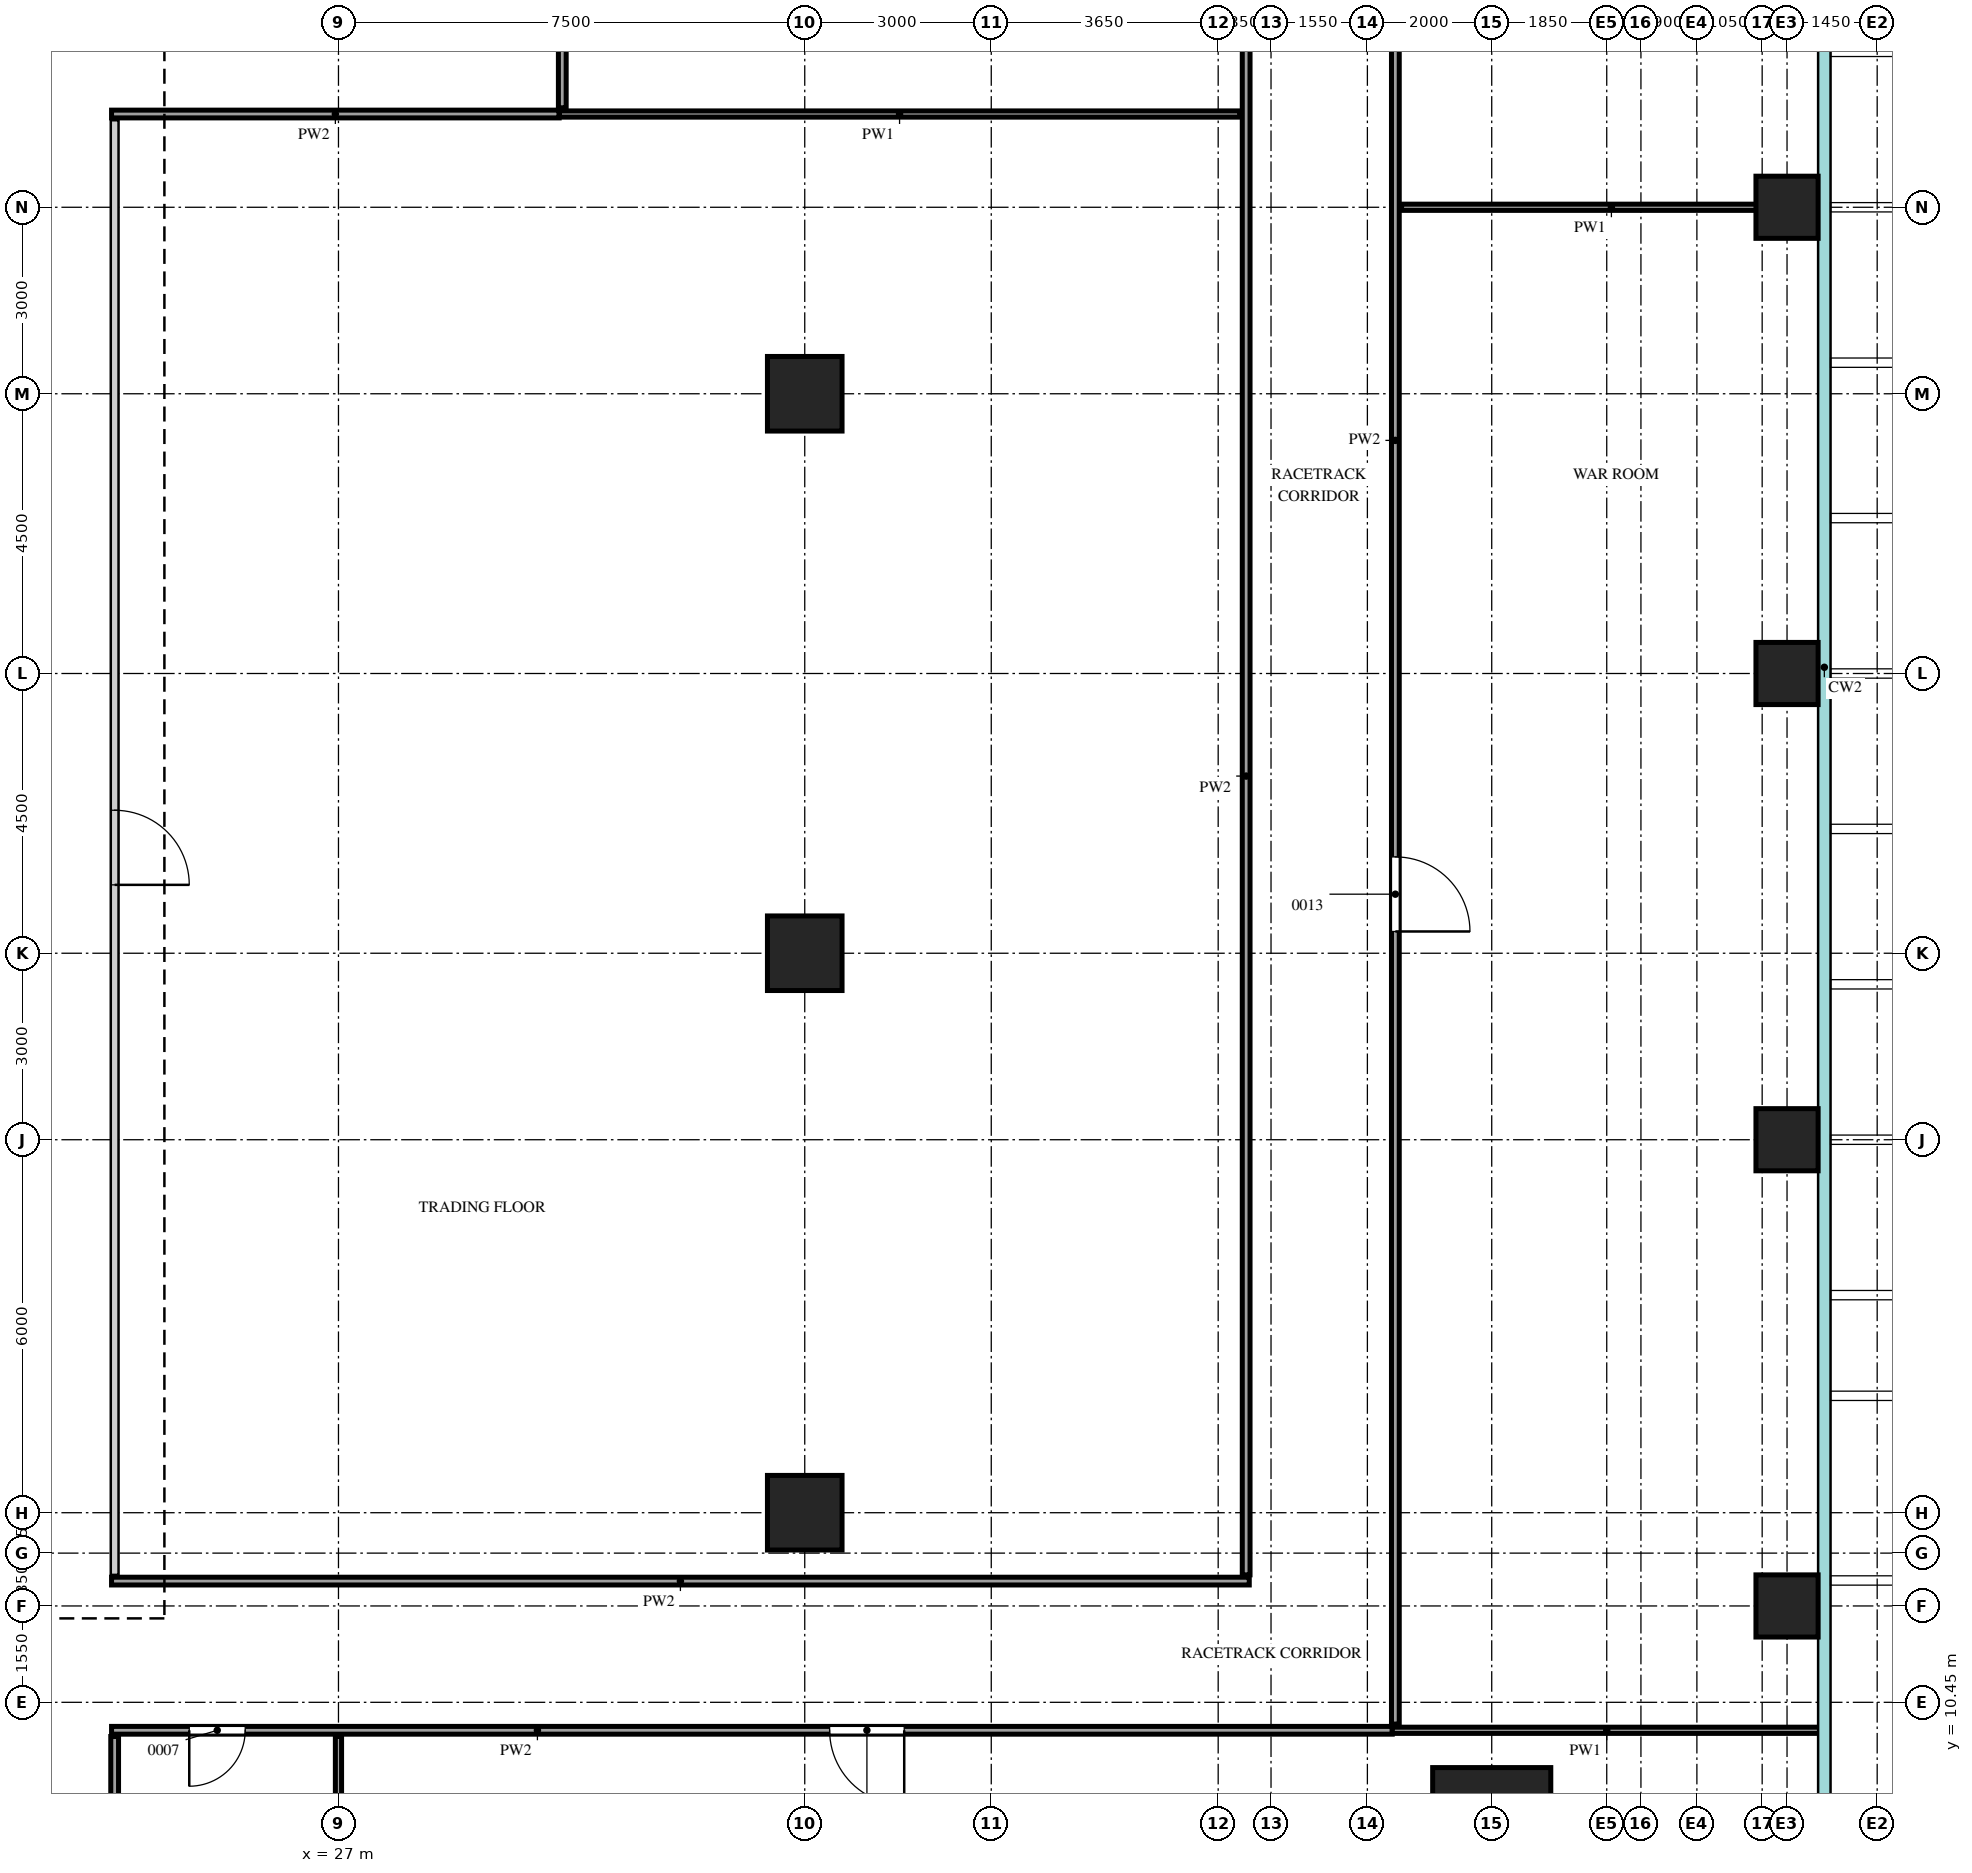
"""IFC4 building model, lengths in metres.
Left out: names, types, materials, properties, quantities, classifications, styles, units other than length and angle.
Written with IfcOpenShell. Run it as: python <this file> out.ifc"""

import sys

from ifc_helpers import new_model, si_unit, direction, frame, frame_2d, origin, origin_2d, place, context, subcontext, project, spatial, rectangle, extrude, source, transform, mapped, element, fill, save


model = new_model("IFC4")
c1 = context("Model", 3, precision=1e-05, world=origin(), true_north=direction((0.0, 1.0)))
c2 = subcontext(c1, "Body", "Model", "MODEL_VIEW")
j1 = project(units=[si_unit("LENGTHUNIT", "METRE"), si_unit("PLANEANGLEUNIT", "RADIAN")], contexts=[c1])
p1 = place(None, origin())
s1 = spatial("IfcSite", under=j1, at=p1, CompositionType="ELEMENT")
p2 = place(p1, origin())
s2 = spatial("IfcBuilding", under=s1, at=p2, CompositionType="ELEMENT")
p3 = place(p2, frame((0.0, 0.0, 212.7)))
s3 = spatial("IfcBuildingStorey", under=s2, at=p3, CompositionType="ELEMENT", Elevation=212.7)
m1 = source(origin(), c2, "Body", "SweptSolid", [
    extrude(rectangle(XDim=1.9, YDim=1.9, at=origin_2d()), origin(), (0.0, 0.0, 1.0), 4.0),
])
p4 = place(p3, frame((45.55, 8.45, 0.0), z_axis=(0.0, 0.0, 1.0), x_axis=(1.0, 0.0, 0.0)))
e1 = element("IfcColumn", 1, at=p4, inside=s3, PredefinedType="COLUMN", context=c2, shape_type="MappedRepresentation", body=[
    mapped(m1, transform((0.0, 0.0, 0.0))),
])
m2 = source(origin(), c2, "Body", "SweptSolid", [
    extrude(rectangle(XDim=1.0, YDim=1.0, at=origin_2d()), origin(), (0.0, 0.0, 1.0), 4.0),
])
for number, where, z_axis, x_axis in (
    (2, (50.3, 12.0, 0.0), (0.0, 0.0, 1.0), (1.0, 0.0, 0.0)),
    (3, (50.3, 19.5, 0.0), (0.0, 0.0, 1.0), (1.0, 0.0, 0.0)),
    (4, (50.3, 27.0, 0.0), (0.0, 0.0, 1.0), (1.0, 0.0, 0.0)),
    (5, (50.3, 34.5, 0.0), (0.0, 0.0, 1.0), (1.0, 0.0, 0.0)),
):
    element("IfcColumn", number, at=place(p3, frame(where, z_axis=z_axis, x_axis=x_axis)), inside=s3, PredefinedType="COLUMN", context=c2, shape_type="MappedRepresentation", body=[
        mapped(m2, transform((0.0, 0.0, 0.0))),
    ])
m3 = source(origin(), c2, "Body", "SweptSolid", [
    extrude(rectangle(XDim=1.2, YDim=1.2, at=origin_2d()), origin(), (0.0, 0.0, 1.0), 4.0),
])
for number, where, z_axis, x_axis in (
    (6, (34.5, 13.5, 0.0), (0.0, 0.0, 1.0), (1.0, 0.0, 0.0)),
    (7, (34.5, 22.5, 0.0), (0.0, 0.0, 1.0), (1.0, 0.0, 0.0)),
    (8, (34.5, 31.5, 0.0), (0.0, 0.0, 1.0), (1.0, 0.0, 0.0)),
):
    element("IfcColumn", number, at=place(p3, frame(where, z_axis=z_axis, x_axis=x_axis)), inside=s3, PredefinedType="COLUMN", context=c2, shape_type="MappedRepresentation", body=[
        mapped(m3, transform((0.0, 0.0, 0.0))),
    ])
m4 = source(origin(), c2, "Body", "SweptSolid", [
    extrude(rectangle(XDim=6.75, YDim=0.1, at=frame_2d((3.375, 0.0))), origin(), (0.0, 0.0, 1.0), 3.15),
])
p5 = place(p3, frame((27.0, 3.15, 0.0), z_axis=(0.0, 0.0, 1.0), x_axis=(0.0, 1.0, 0.0)))
e9 = element("IfcWall", 9, at=p5, inside=s3, PredefinedType="PARTITIONING", context=c2, shape_type="MappedRepresentation", body=[
    mapped(m4, transform((0.0, 0.0, 0.0))),
])
m5 = source(origin(), c2, "Body", "SweptSolid", [
    extrude(rectangle(XDim=3.75, YDim=0.125, at=frame_2d((1.875, 0.0))), origin(), (0.0, 0.0, 1.0), 3.8),
])
p6 = place(p3, frame((23.4, 6.15, 0.0), z_axis=(0.0, 0.0, 1.0), x_axis=(0.0, 1.0, 0.0)))
e10 = element("IfcWall", 10, at=p6, inside=s3, PredefinedType="PARTITIONING", context=c2, shape_type="MappedRepresentation", body=[
    mapped(m5, transform((0.0, 0.0, 0.0))),
])
m6 = source(origin(), c2, "Body", "SweptSolid", [
    extrude(rectangle(XDim=20.6, YDim=0.125, at=frame_2d((10.3, 0.0))), origin(), (0.0, 0.0, 1.0), 3.8),
])
p7 = place(p3, frame((23.35, 10.0, 0.0), z_axis=(0.0, 0.0, 1.0), x_axis=(1.0, 0.0, 0.0)))
e11 = element("IfcWall", 11, at=p7, inside=s3, PredefinedType="PARTITIONING", context=c2, shape_type="MappedRepresentation", body=[
    mapped(m6, transform((0.0, 0.0, 0.0))),
])
m7 = source(origin(), c2, "Body", "SweptSolid", [
    extrude(rectangle(XDim=0.9, YDim=2.1, at=frame_2d((0.45, 1.05))), frame((0.0, 0.073, 0.0), z_axis=(0.0, -1.0, 0.0), x_axis=(1.0, 0.0, 0.0)), (0.0, 0.0, 1.0), 0.145),
])
p8 = place(p7, frame((1.25, 0.0, 0.0)))
e12 = element("IfcOpeningElement", 12, at=p8, cuts=e11, PredefinedType="OPENING", context=c2, shape_type="MappedRepresentation", body=[
    mapped(m7, transform((0.0, 0.0, 0.0))),
])
m8 = source(origin(), c2, "Body", "SweptSolid", [
    extrude(rectangle(XDim=1.2, YDim=2.1, at=frame_2d((0.6, 1.05))), frame((0.0, 0.073, 0.0), z_axis=(0.0, -1.0, 0.0), x_axis=(1.0, 0.0, 0.0)), (0.0, 0.0, 1.0), 0.145),
])
p9 = place(p7, frame((11.55, 0.0, 0.0)))
e13 = element("IfcOpeningElement", 13, at=p9, cuts=e11, PredefinedType="OPENING", context=c2, shape_type="MappedRepresentation", body=[
    mapped(m8, transform((0.0, 0.0, 0.0))),
])
m9 = source(origin(), c2, "Body", "SweptSolid", [
    extrude(rectangle(XDim=6.9, YDim=0.1, at=frame_2d((3.45, 0.0))), origin(), (0.0, 0.0, 1.0), 3.8),
])
p10 = place(p3, frame((43.95, 10.0, 0.0), z_axis=(0.0, 0.0, 1.0), x_axis=(1.0, 0.0, 0.0)))
e14 = element("IfcWall", 14, at=p10, inside=s3, PredefinedType="PARTITIONING", context=c2, shape_type="MappedRepresentation", body=[
    mapped(m9, transform((0.0, 0.0, 0.0))),
])
m10 = source(origin(), c2, "Body", "SweptSolid", [
    extrude(rectangle(XDim=33.8, YDim=0.125, at=frame_2d((16.9, 0.0))), origin(), (0.0, 0.0, 1.0), 3.8),
])
p11 = place(p3, frame((44.0, 10.1, 0.0), z_axis=(0.0, 0.0, 1.0), x_axis=(0.0, 1.0, 0.0)))
e15 = element("IfcWall", 15, at=p11, inside=s3, PredefinedType="PARTITIONING", context=c2, shape_type="MappedRepresentation", body=[
    mapped(m10, transform((0.0, 0.0, 0.0))),
])
p12 = place(p11, frame((12.75, 0.0, 0.0)))
e16 = element("IfcOpeningElement", 16, at=p12, cuts=e15, PredefinedType="OPENING", context=c2, shape_type="MappedRepresentation", body=[
    mapped(m8, transform((0.0, 0.0, 0.0))),
])
p13 = place(p11, frame((27.35, 0.0, 0.0)))
e17 = element("IfcOpeningElement", 17, at=p13, cuts=e15, PredefinedType="OPENING", context=c2, shape_type="MappedRepresentation", body=[
    mapped(m7, transform((0.0, 0.0, 0.0))),
])
m11 = source(origin(), c2, "Body", "SweptSolid", [
    extrude(rectangle(XDim=18.3, YDim=0.125, at=frame_2d((9.15, 0.0))), origin(), (0.0, 0.0, 1.0), 3.8),
])
p14 = place(p3, frame((23.35, 12.4, 0.0), z_axis=(0.0, 0.0, 1.0), x_axis=(1.0, 0.0, 0.0)))
e18 = element("IfcWall", 18, at=p14, inside=s3, PredefinedType="PARTITIONING", context=c2, shape_type="MappedRepresentation", body=[
    mapped(m11, transform((0.0, 0.0, 0.0))),
])
m12 = source(origin(), c2, "Body", "SweptSolid", [
    extrude(rectangle(XDim=23.4, YDim=0.125, at=frame_2d((11.7, 0.0))), origin(), (0.0, 0.0, 1.0), 3.8),
])
p15 = place(p3, frame((23.4, 12.5, 0.0), z_axis=(0.0, 0.0, 1.0), x_axis=(0.0, 1.0, 0.0)))
e19 = element("IfcWall", 19, at=p15, inside=s3, PredefinedType="PARTITIONING", context=c2, shape_type="MappedRepresentation", body=[
    mapped(m12, transform((0.0, 0.0, 0.0))),
])
p16 = place(p15, frame((11.1, 0.0, 0.0)))
e20 = element("IfcOpeningElement", 20, at=p16, cuts=e19, PredefinedType="OPENING", context=c2, shape_type="MappedRepresentation", body=[
    mapped(m8, transform((0.0, 0.0, 0.0))),
])
m13 = source(origin(), c2, "Body", "SweptSolid", [
    extrude(rectangle(XDim=29.0, YDim=0.125, at=frame_2d((14.5, 0.0))), origin(), (0.0, 0.0, 1.0), 3.8),
])
p17 = place(p3, frame((41.6, 12.5, 0.0), z_axis=(0.0, 0.0, 1.0), x_axis=(0.0, 1.0, 0.0)))
e21 = element("IfcWall", 21, at=p17, inside=s3, PredefinedType="PARTITIONING", context=c2, shape_type="MappedRepresentation", body=[
    mapped(m13, transform((0.0, 0.0, 0.0))),
])
p18 = place(p17, frame((25.7, 0.0, 0.0)))
e22 = element("IfcOpeningElement", 22, at=p18, cuts=e21, PredefinedType="OPENING", context=c2, shape_type="MappedRepresentation", body=[
    mapped(m7, transform((0.0, 0.0, 0.0))),
])
m14 = source(origin(), c2, "Body", "SweptSolid", [
    extrude(rectangle(XDim=6.75, YDim=0.1, at=frame_2d((3.375, 0.0))), origin(), (0.0, 0.0, 1.0), 3.8),
])
p19 = place(p3, frame((44.1, 34.5, 0.0), z_axis=(0.0, 0.0, 1.0), x_axis=(1.0, 0.0, 0.0)))
e23 = element("IfcWall", 23, at=p19, inside=s3, PredefinedType="PARTITIONING", context=c2, shape_type="MappedRepresentation", body=[
    mapped(m14, transform((0.0, 0.0, 0.0))),
])
m15 = source(origin(), c2, "Body", "SweptSolid", [
    extrude(rectangle(XDim=7.2, YDim=0.125, at=frame_2d((3.6, 0.0))), origin(), (0.0, 0.0, 1.0), 3.8),
])
p20 = place(p3, frame((23.35, 36.0, 0.0), z_axis=(0.0, 0.0, 1.0), x_axis=(1.0, 0.0, 0.0)))
e24 = element("IfcWall", 24, at=p20, inside=s3, PredefinedType="PARTITIONING", context=c2, shape_type="MappedRepresentation", body=[
    mapped(m15, transform((0.0, 0.0, 0.0))),
])
m16 = source(origin(), c2, "Body", "SweptSolid", [
    extrude(rectangle(XDim=10.95, YDim=0.1, at=frame_2d((5.475, 0.0))), origin(), (0.0, 0.0, 1.0), 3.8),
])
p21 = place(p3, frame((30.55, 36.0, 0.0), z_axis=(0.0, 0.0, 1.0), x_axis=(1.0, 0.0, 0.0)))
e25 = element("IfcWall", 25, at=p21, inside=s3, PredefinedType="PARTITIONING", context=c2, shape_type="MappedRepresentation", body=[
    mapped(m16, transform((0.0, 0.0, 0.0))),
])
m17 = source(origin(), c2, "Body", "SweptSolid", [
    extrude(rectangle(XDim=5.4, YDim=0.125, at=frame_2d((2.7, 0.0))), origin(), (0.0, 0.0, 1.0), 3.8),
])
p22 = place(p3, frame((30.6, 36.1, 0.0), z_axis=(0.0, 0.0, 1.0), x_axis=(0.0, 1.0, 0.0)))
e26 = element("IfcWall", 26, at=p22, inside=s3, PredefinedType="PARTITIONING", context=c2, shape_type="MappedRepresentation", body=[
    mapped(m17, transform((0.0, 0.0, 0.0))),
])
m18 = source(origin(), c2, "Body", "SweptSolid", [
    extrude(rectangle(XDim=0.9, YDim=2.1, at=frame_2d((0.45, 1.05))), frame((0.0, 0.025, 0.0), z_axis=(0.0, -1.0, 0.0), x_axis=(1.0, 0.0, 0.0)), (0.0, 0.0, 1.0), 0.05),
])
p23 = place(p8, origin())
e27 = element("IfcDoor", 27, at=p23, inside=s3, OperationType="SINGLE_SWING_LEFT", PredefinedType="DOOR", context=c2, shape_type="MappedRepresentation", body=[
    mapped(m18, transform((0.0, 0.0, 0.0))),
])
fill(e12, e27)
m19 = source(origin(), c2, "Body", "SweptSolid", [
    extrude(rectangle(XDim=1.2, YDim=2.1, at=frame_2d((0.6, 1.05))), frame((0.0, 0.025, 0.0), z_axis=(0.0, -1.0, 0.0), x_axis=(1.0, 0.0, 0.0)), (0.0, 0.0, 1.0), 0.05),
])
p24 = place(p9, origin())
e28 = element("IfcDoor", 28, at=p24, inside=s3, OperationType="SINGLE_SWING_RIGHT", PredefinedType="DOOR", context=c2, shape_type="MappedRepresentation", body=[
    mapped(m19, transform((0.0, 0.0, 0.0))),
])
fill(e13, e28)
p25 = place(p12, origin())
e29 = element("IfcDoor", 29, at=p25, inside=s3, OperationType="SINGLE_SWING_LEFT", PredefinedType="DOOR", context=c2, shape_type="MappedRepresentation", body=[
    mapped(m19, transform((0.0, 0.0, 0.0))),
])
fill(e16, e29)
p26 = place(p16, origin())
e30 = element("IfcDoor", 30, at=p26, inside=s3, OperationType="SINGLE_SWING_LEFT", PredefinedType="DOOR", context=c2, shape_type="MappedRepresentation", body=[
    mapped(m19, transform((0.0, 0.0, 0.0))),
])
fill(e20, e30)
save(model, sys.argv[1])
